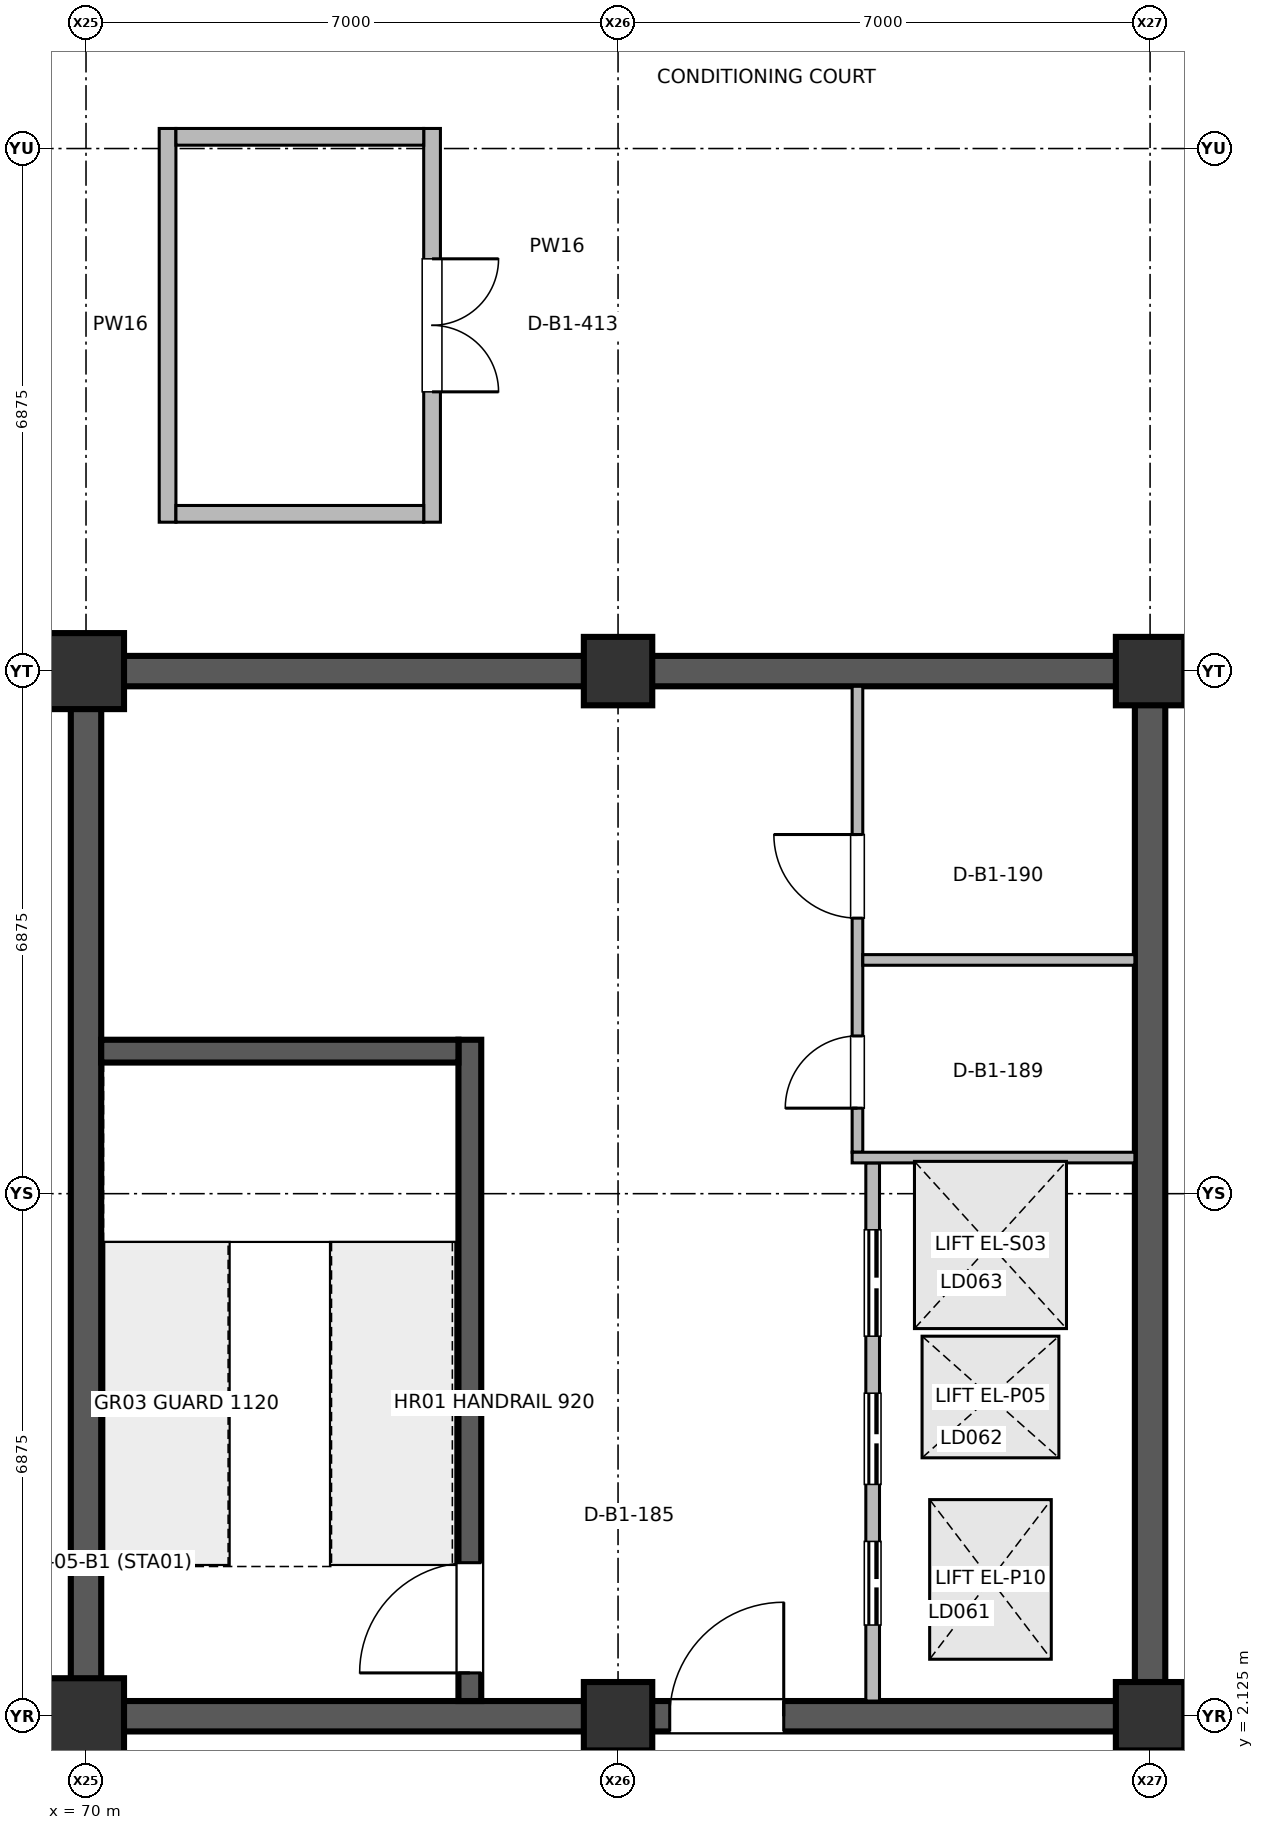
"""IFC4 building model, lengths in metres.
Left out: names, types, materials, properties, quantities, classifications, styles, units other than length and angle.
Written with IfcOpenShell. Run it as: python <this file> out.ifc"""

import sys

from ifc_helpers import new_model, si_unit, direction, frame, frame_2d, origin, origin_2d, place, context, subcontext, project, spatial, rectangle, extrude, element, fill, save


model = new_model("IFC4")
c1 = context("Model", 3, precision=1e-05, world=origin(), true_north=direction((0.0, 1.0)))
c2 = subcontext(c1, "Body", "Model", "MODEL_VIEW")
j1 = project(units=[si_unit("LENGTHUNIT", "METRE"), si_unit("PLANEANGLEUNIT", "RADIAN")], contexts=[c1])
p1 = place(None, origin())
s1 = spatial("IfcSite", under=j1, at=p1, CompositionType="ELEMENT")
p2 = place(p1, origin())
s2 = spatial("IfcBuilding", under=s1, at=p2, CompositionType="ELEMENT")
p3 = place(p2, frame((0.0, 0.0, -6.0)))
s3 = spatial("IfcBuildingStorey", under=s2, at=p3, CompositionType="ELEMENT", Elevation=-6.0)
for number, where, z_axis, x_axis in (
    (1, (70.0, 2.125, 0.0), (0.0, 0.0, 1.0), (1.0, 0.0, 0.0)),
    (2, (70.0, 15.875, 0.0), (0.0, 0.0, 1.0), (1.0, 0.0, 0.0)),
):
    element("IfcColumn", number, at=place(p3, frame(where, z_axis=z_axis, x_axis=x_axis)), inside=s3, PredefinedType="COLUMN", context=c2, shape_type="SweptSolid", body=[
        extrude(rectangle(XDim=1.0, YDim=1.0, at=origin_2d()), origin(), (0.0, 0.0, 1.0), 5.998),
    ])
for number, where, z_axis, x_axis in (
    (3, (77.0, 2.125, 0.0), (0.0, 0.0, 1.0), (1.0, 0.0, 0.0)),
    (4, (77.0, 15.875, 0.0), (0.0, 0.0, 1.0), (1.0, 0.0, 0.0)),
    (5, (84.0, 2.125, 0.0), (0.0, 0.0, 1.0), (1.0, 0.0, 0.0)),
    (6, (84.0, 15.875, 0.0), (0.0, 0.0, 1.0), (1.0, 0.0, 0.0)),
):
    element("IfcColumn", number, at=place(p3, frame(where, z_axis=z_axis, x_axis=x_axis)), inside=s3, PredefinedType="COLUMN", context=c2, shape_type="SweptSolid", body=[
        extrude(rectangle(XDim=0.9, YDim=0.9, at=origin_2d()), origin(), (0.0, 0.0, 1.0), 5.998),
    ])
for number, where, z_axis, x_axis in (
    (7, (70.0, 2.325, 0.0), (0.0, 0.0, 1.0), (0.0, 1.0, 0.0)),
    (8, (84.0, 2.325, 0.0), (0.0, 0.0, 1.0), (0.0, 1.0, 0.0)),
):
    element("IfcWall", number, at=place(p3, frame(where, z_axis=z_axis, x_axis=x_axis)), inside=s3, PredefinedType="SHEAR", context=c2, shape_type="SweptSolid", body=[
        extrude(rectangle(XDim=13.35, YDim=0.4, at=frame_2d((6.675, 0.0))), origin(), (0.0, 0.0, 1.0), 5.72),
    ])
p4 = place(p3, frame((70.2, 2.125, 0.0), z_axis=(0.0, 0.0, 1.0), x_axis=(1.0, 0.0, 0.0)))
e9 = element("IfcWall", 9, at=p4, inside=s3, PredefinedType="SHEAR", context=c2, shape_type="SweptSolid", body=[
    extrude(rectangle(XDim=13.6, YDim=0.4, at=frame_2d((6.8, 0.0))), origin(), (0.0, 0.0, 1.0), 5.72),
])
p5 = place(p4, frame((7.48, 0.0, 0.0)))
e10 = element("IfcOpeningElement", 10, at=p5, cuts=e9, PredefinedType="OPENING", context=c2, shape_type="SweptSolid", body=[
    extrude(rectangle(XDim=1.5, YDim=2.2, at=frame_2d((0.75, 1.1))), frame((0.0, 0.21, 0.0), z_axis=(0.0, -1.0, 0.0), x_axis=(1.0, 0.0, 0.0)), (0.0, 0.0, 1.0), 0.42),
])
p6 = place(p3, frame((70.2, 15.875, 0.0), z_axis=(0.0, 0.0, 1.0), x_axis=(1.0, 0.0, 0.0)))
e11 = element("IfcWall", 11, at=p6, inside=s3, PredefinedType="SHEAR", context=c2, shape_type="SweptSolid", body=[
    extrude(rectangle(XDim=13.6, YDim=0.4, at=frame_2d((6.8, 0.0))), origin(), (0.0, 0.0, 1.0), 5.72),
])
p7 = place(p3, frame((75.05, 2.325, 0.0), z_axis=(0.0, 0.0, 1.0), x_axis=(0.0, 1.0, 0.0)))
e12 = element("IfcWall", 12, at=p7, inside=s3, PredefinedType="SHEAR", context=c2, shape_type="SweptSolid", body=[
    extrude(rectangle(XDim=8.7, YDim=0.3, at=frame_2d((4.35, 0.0))), origin(), (0.0, 0.0, 1.0), 5.72),
])
p8 = place(p7, frame((0.37, 0.0, 0.0)))
e13 = element("IfcOpeningElement", 13, at=p8, cuts=e12, PredefinedType="OPENING", context=c2, shape_type="SweptSolid", body=[
    extrude(rectangle(XDim=1.45, YDim=2.2, at=frame_2d((0.725, 1.1))), frame((0.0, 0.16, 0.0), z_axis=(0.0, -1.0, 0.0), x_axis=(1.0, 0.0, 0.0)), (0.0, 0.0, 1.0), 0.32),
])
p9 = place(p3, frame((80.35, 2.325, 0.0), z_axis=(0.0, 0.0, 1.0), x_axis=(0.0, 1.0, 0.0)))
e14 = element("IfcWall", 14, at=p9, inside=s3, PredefinedType="PARTITIONING", context=c2, shape_type="SweptSolid", body=[
    extrude(rectangle(XDim=7.08, YDim=0.18, at=frame_2d((3.54, 0.0))), origin(), (0.0, 0.0, 1.0), 5.02),
])
p10 = place(p9, frame((1.0, 0.0, 0.0)))
e15 = element("IfcOpeningElement", 15, at=p10, cuts=e14, PredefinedType="OPENING", context=c2, shape_type="SweptSolid", body=[
    extrude(rectangle(XDim=1.1, YDim=2.2, at=frame_2d((0.55, 1.1))), frame((0.0, 0.1, 0.0), z_axis=(0.0, -1.0, 0.0), x_axis=(1.0, 0.0, 0.0)), (0.0, 0.0, 1.0), 0.2),
])
p11 = place(p9, frame((2.85, 0.0, 0.0)))
e16 = element("IfcOpeningElement", 16, at=p11, cuts=e14, PredefinedType="OPENING", context=c2, shape_type="SweptSolid", body=[
    extrude(rectangle(XDim=1.2, YDim=2.25, at=frame_2d((0.6, 1.125))), frame((0.0, 0.1, 0.0), z_axis=(0.0, -1.0, 0.0), x_axis=(1.0, 0.0, 0.0)), (0.0, 0.0, 1.0), 0.2),
])
p12 = place(p9, frame((4.8, 0.0, 0.0)))
e17 = element("IfcOpeningElement", 17, at=p12, cuts=e14, PredefinedType="OPENING", context=c2, shape_type="SweptSolid", body=[
    extrude(rectangle(XDim=1.4, YDim=2.3, at=frame_2d((0.7, 1.15))), frame((0.0, 0.1, 0.0), z_axis=(0.0, -1.0, 0.0), x_axis=(1.0, 0.0, 0.0)), (0.0, 0.0, 1.0), 0.2),
])
p13 = place(p3, frame((80.15, 9.545, 0.0), z_axis=(0.0, 0.0, 1.0), x_axis=(0.0, 1.0, 0.0)))
e18 = element("IfcWall", 18, at=p13, inside=s3, PredefinedType="PARTITIONING", context=c2, shape_type="SweptSolid", body=[
    extrude(rectangle(XDim=6.13, YDim=0.14, at=frame_2d((3.065, 0.0))), origin(), (0.0, 0.0, 1.0), 5.02),
])
p14 = place(p13, frame((0.58, 0.0, 0.0)))
e19 = element("IfcOpeningElement", 19, at=p14, cuts=e18, PredefinedType="OPENING", context=c2, shape_type="SweptSolid", body=[
    extrude(rectangle(XDim=0.95, YDim=2.15, at=frame_2d((0.475, 1.075))), frame((0.0, 0.08, 0.0), z_axis=(0.0, -1.0, 0.0), x_axis=(1.0, 0.0, 0.0)), (0.0, 0.0, 1.0), 0.16),
])
p15 = place(p13, frame((3.08, 0.0, 0.0)))
e20 = element("IfcOpeningElement", 20, at=p15, cuts=e18, PredefinedType="OPENING", context=c2, shape_type="SweptSolid", body=[
    extrude(rectangle(XDim=1.1, YDim=2.15, at=frame_2d((0.55, 1.075))), frame((0.0, 0.08, 0.0), z_axis=(0.0, -1.0, 0.0), x_axis=(1.0, 0.0, 0.0)), (0.0, 0.0, 1.0), 0.16),
])
p16 = place(p3, frame((74.553, 23.014, 0.0), z_axis=(0.0, 0.0, 1.0), x_axis=(0.0, -1.0, 0.0)))
e21 = element("IfcWall", 21, at=p16, inside=s3, PredefinedType="PARTITIONING", context=c2, shape_type="SweptSolid", body=[
    extrude(rectangle(XDim=5.18, YDim=0.22, at=frame_2d((2.59, 0.0))), origin(), (0.0, 0.0, 1.0), 5.02),
])
p17 = place(p16, frame((1.715, 0.0, 0.0)))
e22 = element("IfcOpeningElement", 22, at=p17, cuts=e21, PredefinedType="OPENING", context=c2, shape_type="SweptSolid", body=[
    extrude(rectangle(XDim=1.75, YDim=2.35, at=frame_2d((0.875, 1.175))), frame((0.0, 0.12, 0.0), z_axis=(0.0, -1.0, 0.0), x_axis=(1.0, 0.0, 0.0)), (0.0, 0.0, 1.0), 0.24),
])
p18 = place(p3, frame((80.08, 9.475, 0.0), z_axis=(0.0, 0.0, 1.0), x_axis=(1.0, 0.0, 0.0)))
e23 = element("IfcWall", 23, at=p18, inside=s3, PredefinedType="PARTITIONING", context=c2, shape_type="SweptSolid", body=[
    extrude(rectangle(XDim=3.72, YDim=0.14, at=frame_2d((1.86, 0.0))), origin(), (0.0, 0.0, 1.0), 5.02),
])
p19 = place(p3, frame((80.22, 12.075, 0.0), z_axis=(0.0, 0.0, 1.0), x_axis=(1.0, 0.0, 0.0)))
e24 = element("IfcWall", 24, at=p19, inside=s3, PredefinedType="PARTITIONING", context=c2, shape_type="SweptSolid", body=[
    extrude(rectangle(XDim=3.58, YDim=0.14, at=frame_2d((1.79, 0.0))), origin(), (0.0, 0.0, 1.0), 5.02),
])
p20 = place(p3, frame((71.073, 17.834, 0.0), z_axis=(0.0, 0.0, 1.0), x_axis=(0.0, 1.0, 0.0)))
e25 = element("IfcWall", 25, at=p20, inside=s3, PredefinedType="PARTITIONING", context=c2, shape_type="SweptSolid", body=[
    extrude(rectangle(XDim=5.18, YDim=0.22, at=frame_2d((2.59, 0.0))), origin(), (0.0, 0.0, 1.0), 5.02),
])
for number, where, z_axis, x_axis in (
    (26, (71.183, 17.944, 0.0), (0.0, 0.0, 1.0), (1.0, 0.0, 0.0)),
    (27, (71.183, 22.904, 0.0), (0.0, 0.0, 1.0), (1.0, 0.0, 0.0)),
):
    element("IfcWall", number, at=place(p3, frame(where, z_axis=z_axis, x_axis=x_axis)), inside=s3, PredefinedType="PARTITIONING", context=c2, shape_type="SweptSolid", body=[
        extrude(rectangle(XDim=3.26, YDim=0.22, at=frame_2d((1.63, 0.0))), origin(), (0.0, 0.0, 1.0), 5.02),
    ])
p21 = place(p3, frame((70.2, 10.875, 0.0), z_axis=(0.0, 0.0, 1.0), x_axis=(1.0, 0.0, 0.0)))
e28 = element("IfcWall", 28, at=p21, inside=s3, PredefinedType="SHEAR", context=c2, shape_type="SweptSolid", body=[
    extrude(rectangle(XDim=4.7, YDim=0.3, at=frame_2d((2.35, 0.0))), origin(), (0.0, 0.0, 1.0), 5.72),
])
p22 = place(p5, origin())
e29 = element("IfcDoor", 29, at=p22, inside=s3, OperationType="SINGLE_SWING_RIGHT", PredefinedType="DOOR", context=c2, shape_type="SweptSolid", body=[
    extrude(rectangle(XDim=1.5, YDim=2.2, at=frame_2d((0.75, 1.1))), frame((0.0, 0.025, 0.0), z_axis=(0.0, -1.0, 0.0), x_axis=(1.0, 0.0, 0.0)), (0.0, 0.0, 1.0), 0.05),
])
fill(e10, e29)
p23 = place(p8, origin())
e30 = element("IfcDoor", 30, at=p23, inside=s3, OperationType="SINGLE_SWING_LEFT", PredefinedType="DOOR", context=c2, shape_type="SweptSolid", body=[
    extrude(rectangle(XDim=1.45, YDim=2.2, at=frame_2d((0.725, 1.1))), frame((0.0, 0.025, 0.0), z_axis=(0.0, -1.0, 0.0), x_axis=(1.0, 0.0, 0.0)), (0.0, 0.0, 1.0), 0.05),
])
fill(e13, e30)
p24 = place(p10, origin())
e31 = element("IfcDoor", 31, at=p24, inside=s3, OperationType="DOUBLE_DOOR_SLIDING", PredefinedType="DOOR", context=c2, shape_type="SweptSolid", body=[
    extrude(rectangle(XDim=1.1, YDim=2.2, at=frame_2d((0.55, 1.1))), frame((0.0, 0.025, 0.0), z_axis=(0.0, -1.0, 0.0), x_axis=(1.0, 0.0, 0.0)), (0.0, 0.0, 1.0), 0.05),
])
fill(e15, e31)
p25 = place(p11, origin())
e32 = element("IfcDoor", 32, at=p25, inside=s3, OperationType="DOUBLE_DOOR_SLIDING", PredefinedType="DOOR", context=c2, shape_type="SweptSolid", body=[
    extrude(rectangle(XDim=1.2, YDim=2.25, at=frame_2d((0.6, 1.125))), frame((0.0, 0.025, 0.0), z_axis=(0.0, -1.0, 0.0), x_axis=(1.0, 0.0, 0.0)), (0.0, 0.0, 1.0), 0.05),
])
fill(e16, e32)
p26 = place(p12, origin())
e33 = element("IfcDoor", 33, at=p26, inside=s3, OperationType="DOUBLE_DOOR_SLIDING", PredefinedType="DOOR", context=c2, shape_type="SweptSolid", body=[
    extrude(rectangle(XDim=1.4, YDim=2.3, at=frame_2d((0.7, 1.15))), frame((0.0, 0.025, 0.0), z_axis=(0.0, -1.0, 0.0), x_axis=(1.0, 0.0, 0.0)), (0.0, 0.0, 1.0), 0.05),
])
fill(e17, e33)
p27 = place(p14, origin())
e34 = element("IfcDoor", 34, at=p27, inside=s3, OperationType="SINGLE_SWING_LEFT", PredefinedType="DOOR", context=c2, shape_type="SweptSolid", body=[
    extrude(rectangle(XDim=0.95, YDim=2.15, at=frame_2d((0.475, 1.075))), frame((0.0, 0.025, 0.0), z_axis=(0.0, -1.0, 0.0), x_axis=(1.0, 0.0, 0.0)), (0.0, 0.0, 1.0), 0.05),
])
fill(e19, e34)
p28 = place(p15, origin())
e35 = element("IfcDoor", 35, at=p28, inside=s3, OperationType="SINGLE_SWING_RIGHT", PredefinedType="DOOR", context=c2, shape_type="SweptSolid", body=[
    extrude(rectangle(XDim=1.1, YDim=2.15, at=frame_2d((0.55, 1.075))), frame((0.0, 0.025, 0.0), z_axis=(0.0, -1.0, 0.0), x_axis=(1.0, 0.0, 0.0)), (0.0, 0.0, 1.0), 0.05),
])
fill(e20, e35)
p29 = place(p17, origin())
e36 = element("IfcDoor", 36, at=p29, inside=s3, OperationType="DOUBLE_DOOR_SINGLE_SWING", PredefinedType="DOOR", context=c2, shape_type="SweptSolid", body=[
    extrude(rectangle(XDim=1.75, YDim=2.35, at=frame_2d((0.875, 1.175))), frame((0.0, 0.025, 0.0), z_axis=(0.0, -1.0, 0.0), x_axis=(1.0, 0.0, 0.0)), (0.0, 0.0, 1.0), 0.05),
])
fill(e22, e36)
save(model, sys.argv[1])
